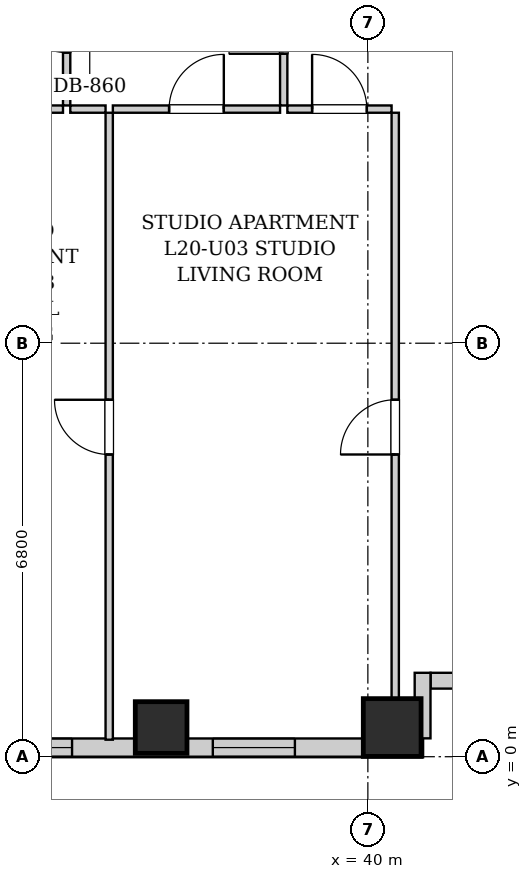
"""IFC4 building model, lengths in metres.
Left out: names, types, materials, properties, quantities, classifications, styles, units other than length and angle.
Written with IfcOpenShell. Run it as: python <this file> out.ifc"""

import sys

from ifc_helpers import new_model, si_unit, direction, frame, frame_2d, origin, origin_2d, place, context, subcontext, project, spatial, rectangle, extrude, element, fill, save


model = new_model("IFC4")
c1 = context("Model", 3, precision=1e-05, world=origin(), true_north=direction((0.0, 1.0)))
c2 = subcontext(c1, "Body", "Model", "MODEL_VIEW")
j1 = project(units=[si_unit("LENGTHUNIT", "METRE"), si_unit("PLANEANGLEUNIT", "RADIAN")], contexts=[c1])
p1 = place(None, origin())
s1 = spatial("IfcSite", under=j1, at=p1, CompositionType="ELEMENT")
p2 = place(p1, origin())
s2 = spatial("IfcBuilding", under=s1, at=p2, CompositionType="ELEMENT")
p3 = place(p2, frame((0.0, 0.0, 75.1)))
s3 = spatial("IfcBuildingStorey", under=s2, at=p3, CompositionType="ELEMENT", Elevation=75.1)
p4 = place(p3, frame((36.6, 0.48, 0.0), z_axis=(0.0, 0.0, 1.0), x_axis=(1.0, 0.0, 0.0)))
e1 = element("IfcColumn", 1, at=p4, inside=s3, PredefinedType="COLUMN", context=c2, shape_type="SweptSolid", body=[
    extrude(rectangle(XDim=0.85, YDim=0.85, at=origin_2d()), origin(), (0.0, 0.0, 1.0), 3.2),
])
p5 = place(p3, frame((40.4, 0.48, 0.0), z_axis=(0.0, 0.0, 1.0), x_axis=(1.0, 0.0, 0.0)))
e2 = element("IfcColumn", 2, at=p5, inside=s3, PredefinedType="COLUMN", context=c2, shape_type="SweptSolid", body=[
    extrude(rectangle(XDim=0.95, YDim=0.95, at=origin_2d()), origin(), (0.0, 0.0, 1.0), 3.2),
])
p6 = place(p3, frame((40.9, 0.15, 0.0), z_axis=(0.0, 0.0, 1.0), x_axis=(-1.0, 0.0, 0.0)))
e3 = element("IfcWall", 3, at=p6, inside=s3, PredefinedType="SOLIDWALL", context=c2, shape_type="SweptSolid", body=[
    extrude(rectangle(XDim=23.7, YDim=0.3, at=frame_2d((11.85, 0.0))), origin(), (0.0, 0.0, 1.0), 2.94),
])
p7 = place(p6, frame((20.625, 0.0, 0.55)))
e4 = element("IfcOpeningElement", 4, at=p7, cuts=e3, PredefinedType="OPENING", context=c2, shape_type="SweptSolid", body=[
    extrude(rectangle(XDim=1.35, YDim=1.2, at=frame_2d((0.675, 0.6))), frame((0.0, 0.16, 0.0), z_axis=(0.0, -1.0, 0.0), x_axis=(1.0, 0.0, 0.0)), (0.0, 0.0, 1.0), 0.32),
])
p8 = place(p6, frame((12.55, 0.0, 0.55)))
e5 = element("IfcOpeningElement", 5, at=p8, cuts=e3, PredefinedType="OPENING", context=c2, shape_type="SweptSolid", body=[
    extrude(rectangle(XDim=0.85, YDim=1.2, at=frame_2d((0.425, 0.6))), frame((0.0, 0.16, 0.0), z_axis=(0.0, -1.0, 0.0), x_axis=(1.0, 0.0, 0.0)), (0.0, 0.0, 1.0), 0.32),
])
p9 = place(p6, frame((9.6, 0.0, 0.55)))
e6 = element("IfcOpeningElement", 6, at=p9, cuts=e3, PredefinedType="OPENING", context=c2, shape_type="SweptSolid", body=[
    extrude(rectangle(XDim=1.35, YDim=1.2, at=frame_2d((0.675, 0.6))), frame((0.0, 0.16, 0.0), z_axis=(0.0, -1.0, 0.0), x_axis=(1.0, 0.0, 0.0)), (0.0, 0.0, 1.0), 0.32),
])
p10 = place(p6, frame((5.765, 0.0, 0.55)))
e7 = element("IfcOpeningElement", 7, at=p10, cuts=e3, PredefinedType="OPENING", context=c2, shape_type="SweptSolid", body=[
    extrude(rectangle(XDim=1.35, YDim=1.2, at=frame_2d((0.675, 0.6))), frame((0.0, 0.16, 0.0), z_axis=(0.0, -1.0, 0.0), x_axis=(1.0, 0.0, 0.0)), (0.0, 0.0, 1.0), 0.32),
])
p11 = place(p6, frame((2.1, 0.0, 0.55)))
e8 = element("IfcOpeningElement", 8, at=p11, cuts=e3, PredefinedType="OPENING", context=c2, shape_type="SweptSolid", body=[
    extrude(rectangle(XDim=1.35, YDim=1.2, at=frame_2d((0.675, 0.6))), frame((0.0, 0.16, 0.0), z_axis=(0.0, -1.0, 0.0), x_axis=(1.0, 0.0, 0.0)), (0.0, 0.0, 1.0), 0.32),
])
p12 = place(p3, frame((42.018, 1.25, 0.0), z_axis=(0.0, 0.0, 1.0), x_axis=(-1.0, 0.0, 0.0)))
e9 = element("IfcWall", 9, at=p12, inside=s3, PredefinedType="SOLIDWALL", context=c2, shape_type="SweptSolid", body=[
    extrude(rectangle(XDim=0.986, YDim=0.26, at=frame_2d((0.493, 0.0))), origin(), (0.0, 0.0, 1.0), 2.94),
])
p13 = place(p3, frame((40.9, 1.38, 0.0), z_axis=(0.0, 0.0, 1.0), x_axis=(0.0, -1.0, 0.0)))
e10 = element("IfcWall", 10, at=p13, inside=s3, PredefinedType="SOLIDWALL", context=c2, shape_type="SweptSolid", body=[
    extrude(rectangle(XDim=1.078, YDim=0.26, at=frame_2d((0.539, 0.0))), origin(), (0.0, 0.0, 1.0), 2.94),
])
p14 = place(p3, frame((35.046, 10.71, 0.0), z_axis=(0.0, 0.0, 1.0), x_axis=(0.0, 1.0, 0.0)))
e11 = element("IfcWall", 11, at=p14, inside=s3, PredefinedType="PARTITIONING", context=c2, shape_type="SweptSolid", body=[
    extrude(rectangle(XDim=2.6, YDim=0.12, at=frame_2d((1.3, 0.0))), origin(), (0.0, 0.0, 1.0), 2.94),
])
p15 = place(p14, frame((0.87, 0.0, 0.0)))
e12 = element("IfcOpeningElement", 12, at=p15, cuts=e11, PredefinedType="OPENING", context=c2, shape_type="SweptSolid", body=[
    extrude(rectangle(XDim=0.86, YDim=2.05, at=frame_2d((0.43, 1.025))), frame((0.0, 0.07, 0.0), z_axis=(0.0, -1.0, 0.0), x_axis=(1.0, 0.0, 0.0)), (0.0, 0.0, 1.0), 0.14),
])
p16 = place(p3, frame((32.586, 10.65, 0.0), z_axis=(0.0, 0.0, 1.0), x_axis=(1.0, 0.0, 0.0)))
e13 = element("IfcWall", 13, at=p16, inside=s3, PredefinedType="PARTITIONING", context=c2, shape_type="SweptSolid", body=[
    extrude(rectangle(XDim=2.4, YDim=0.12, at=frame_2d((1.2, 0.0))), origin(), (0.0, 0.0, 1.0), 2.94),
])
p17 = place(p3, frame((38.616, 10.71, 0.0), z_axis=(0.0, 0.0, 1.0), x_axis=(0.0, 1.0, 0.0)))
e14 = element("IfcWall", 14, at=p17, inside=s3, PredefinedType="PARTITIONING", context=c2, shape_type="SweptSolid", body=[
    extrude(rectangle(XDim=2.6, YDim=0.12, at=frame_2d((1.3, 0.0))), origin(), (0.0, 0.0, 1.0), 2.94),
])
p18 = place(p17, frame((0.85, 0.0, 0.0)))
e15 = element("IfcOpeningElement", 15, at=p18, cuts=e14, PredefinedType="OPENING", context=c2, shape_type="SweptSolid", body=[
    extrude(rectangle(XDim=0.9, YDim=2.05, at=frame_2d((0.45, 1.025))), frame((0.0, 0.07, 0.0), z_axis=(0.0, -1.0, 0.0), x_axis=(1.0, 0.0, 0.0)), (0.0, 0.0, 1.0), 0.14),
])
p19 = place(p3, frame((35.106, 10.65, 0.0), z_axis=(0.0, 0.0, 1.0), x_axis=(1.0, 0.0, 0.0)))
e16 = element("IfcWall", 16, at=p19, inside=s3, PredefinedType="PARTITIONING", context=c2, shape_type="SweptSolid", body=[
    extrude(rectangle(XDim=0.58, YDim=0.12, at=frame_2d((0.29, 0.0))), origin(), (0.0, 0.0, 1.0), 2.94),
])
p20 = place(p3, frame((35.806, 10.65, 0.0), z_axis=(0.0, 0.0, 1.0), x_axis=(1.0, 0.0, 0.0)))
e17 = element("IfcWall", 17, at=p20, inside=s3, PredefinedType="PARTITIONING", context=c2, shape_type="SweptSolid", body=[
    extrude(rectangle(XDim=2.75, YDim=0.12, at=frame_2d((1.375, 0.0))), origin(), (0.0, 0.0, 1.0), 2.94),
])
p21 = place(p20, frame((0.925, 0.0, 0.0)))
e18 = element("IfcOpeningElement", 18, at=p21, cuts=e17, PredefinedType="OPENING", context=c2, shape_type="SweptSolid", body=[
    extrude(rectangle(XDim=0.9, YDim=2.05, at=frame_2d((0.45, 1.025))), frame((0.0, 0.07, 0.0), z_axis=(0.0, -1.0, 0.0), x_axis=(1.0, 0.0, 0.0)), (0.0, 0.0, 1.0), 0.14),
])
p22 = place(p3, frame((38.676, 10.65, 0.0), z_axis=(0.0, 0.0, 1.0), x_axis=(1.0, 0.0, 0.0)))
e19 = element("IfcWall", 19, at=p22, inside=s3, PredefinedType="PARTITIONING", context=c2, shape_type="SweptSolid", body=[
    extrude(rectangle(XDim=1.714, YDim=0.12, at=frame_2d((0.857, 0.0))), origin(), (0.0, 0.0, 1.0), 2.94),
])
p23 = place(p22, frame((0.407, 0.0, 0.0)))
e20 = element("IfcOpeningElement", 20, at=p23, cuts=e19, PredefinedType="OPENING", context=c2, shape_type="SweptSolid", body=[
    extrude(rectangle(XDim=0.9, YDim=2.05, at=frame_2d((0.45, 1.025))), frame((0.0, 0.07, 0.0), z_axis=(0.0, -1.0, 0.0), x_axis=(1.0, 0.0, 0.0)), (0.0, 0.0, 1.0), 0.14),
])
p24 = place(p3, frame((35.746, 0.28, 0.0), z_axis=(0.0, 0.0, 1.0), x_axis=(0.0, 1.0, 0.0)))
e21 = element("IfcWall", 21, at=p24, inside=s3, PredefinedType="PARTITIONING", context=c2, shape_type="SweptSolid", body=[
    extrude(rectangle(XDim=10.31, YDim=0.12, at=frame_2d((5.155, 0.0))), origin(), (0.0, 0.0, 1.0), 2.94),
])
p25 = place(p24, frame((4.69, 0.0, 0.0)))
e22 = element("IfcOpeningElement", 22, at=p25, cuts=e21, PredefinedType="OPENING", context=c2, shape_type="SweptSolid", body=[
    extrude(rectangle(XDim=0.9, YDim=2.05, at=frame_2d((0.45, 1.025))), frame((0.0, 0.07, 0.0), z_axis=(0.0, -1.0, 0.0), x_axis=(1.0, 0.0, 0.0)), (0.0, 0.0, 1.0), 0.14),
])
p26 = place(p3, frame((40.45, 0.28, 0.0), z_axis=(0.0, 0.0, 1.0), x_axis=(0.0, 1.0, 0.0)))
e23 = element("IfcWall", 23, at=p26, inside=s3, PredefinedType="PARTITIONING", context=c2, shape_type="SweptSolid", body=[
    extrude(rectangle(XDim=10.31, YDim=0.12, at=frame_2d((5.155, 0.0))), origin(), (0.0, 0.0, 1.0), 2.94),
])
p27 = place(p26, frame((4.69, 0.0, 0.0)))
e24 = element("IfcOpeningElement", 24, at=p27, cuts=e23, PredefinedType="OPENING", context=c2, shape_type="SweptSolid", body=[
    extrude(rectangle(XDim=0.9, YDim=2.05, at=frame_2d((0.45, 1.025))), frame((0.0, 0.07, 0.0), z_axis=(0.0, -1.0, 0.0), x_axis=(1.0, 0.0, 0.0)), (0.0, 0.0, 1.0), 0.14),
])
p28 = place(p15, origin())
e25 = element("IfcDoor", 25, at=p28, inside=s3, OperationType="SINGLE_SWING_RIGHT", PredefinedType="DOOR", context=c2, shape_type="SweptSolid", body=[
    extrude(rectangle(XDim=0.86, YDim=2.05, at=frame_2d((0.43, 1.025))), frame((0.0, 0.025, 0.0), z_axis=(0.0, -1.0, 0.0), x_axis=(1.0, 0.0, 0.0)), (0.0, 0.0, 1.0), 0.05),
])
fill(e12, e25)
p29 = place(p18, origin())
e26 = element("IfcDoor", 26, at=p29, inside=s3, OperationType="SINGLE_SWING_LEFT", PredefinedType="DOOR", context=c2, shape_type="SweptSolid", body=[
    extrude(rectangle(XDim=0.9, YDim=2.05, at=frame_2d((0.45, 1.025))), frame((0.0, 0.025, 0.0), z_axis=(0.0, -1.0, 0.0), x_axis=(1.0, 0.0, 0.0)), (0.0, 0.0, 1.0), 0.05),
])
fill(e15, e26)
p30 = place(p21, origin())
e27 = element("IfcDoor", 27, at=p30, inside=s3, OperationType="SINGLE_SWING_RIGHT", PredefinedType="DOOR", context=c2, shape_type="SweptSolid", body=[
    extrude(rectangle(XDim=0.9, YDim=2.05, at=frame_2d((0.45, 1.025))), frame((0.0, 0.025, 0.0), z_axis=(0.0, -1.0, 0.0), x_axis=(1.0, 0.0, 0.0)), (0.0, 0.0, 1.0), 0.05),
])
fill(e18, e27)
p31 = place(p23, origin())
e28 = element("IfcDoor", 28, at=p31, inside=s3, OperationType="SINGLE_SWING_LEFT", PredefinedType="DOOR", context=c2, shape_type="SweptSolid", body=[
    extrude(rectangle(XDim=0.9, YDim=2.05, at=frame_2d((0.45, 1.025))), frame((0.0, 0.025, 0.0), z_axis=(0.0, -1.0, 0.0), x_axis=(1.0, 0.0, 0.0)), (0.0, 0.0, 1.0), 0.05),
])
fill(e20, e28)
p32 = place(p25, origin())
e29 = element("IfcDoor", 29, at=p32, inside=s3, OperationType="SINGLE_SWING_RIGHT", PredefinedType="DOOR", context=c2, shape_type="SweptSolid", body=[
    extrude(rectangle(XDim=0.9, YDim=2.05, at=frame_2d((0.45, 1.025))), frame((0.0, 0.025, 0.0), z_axis=(0.0, -1.0, 0.0), x_axis=(1.0, 0.0, 0.0)), (0.0, 0.0, 1.0), 0.05),
])
fill(e22, e29)
p33 = place(p27, origin())
e30 = element("IfcDoor", 30, at=p33, inside=s3, OperationType="SINGLE_SWING_LEFT", PredefinedType="DOOR", context=c2, shape_type="SweptSolid", body=[
    extrude(rectangle(XDim=0.9, YDim=2.05, at=frame_2d((0.45, 1.025))), frame((0.0, 0.025, 0.0), z_axis=(0.0, -1.0, 0.0), x_axis=(1.0, 0.0, 0.0)), (0.0, 0.0, 1.0), 0.05),
])
fill(e24, e30)
p34 = place(p10, origin())
e31 = element("IfcWindow", 31, at=p34, inside=s3, PartitioningType="SINGLE_PANEL", PredefinedType="WINDOW", context=c2, shape_type="SweptSolid", body=[
    extrude(rectangle(XDim=1.35, YDim=1.2, at=frame_2d((0.675, 0.6))), frame((0.0, 0.03, 0.0), z_axis=(0.0, -1.0, 0.0), x_axis=(1.0, 0.0, 0.0)), (0.0, 0.0, 1.0), 0.06),
])
fill(e7, e31)
p35 = place(p11, origin())
e32 = element("IfcWindow", 32, at=p35, inside=s3, PartitioningType="SINGLE_PANEL", PredefinedType="WINDOW", context=c2, shape_type="SweptSolid", body=[
    extrude(rectangle(XDim=1.35, YDim=1.2, at=frame_2d((0.675, 0.6))), frame((0.0, 0.03, 0.0), z_axis=(0.0, -1.0, 0.0), x_axis=(1.0, 0.0, 0.0)), (0.0, 0.0, 1.0), 0.06),
])
fill(e8, e32)
save(model, sys.argv[1])
